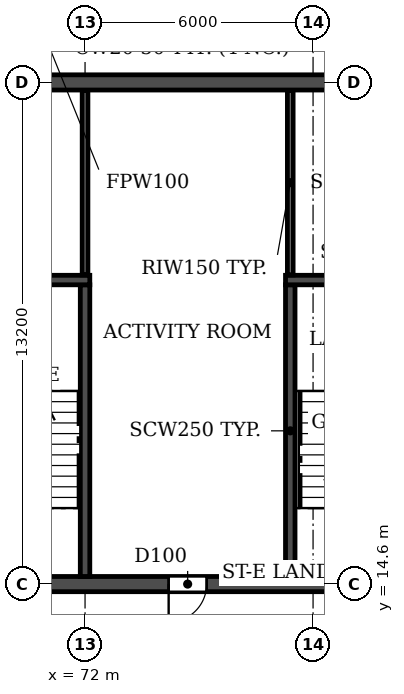
"""IFC4 building model, lengths in metres.
Left out: names, types, materials, properties, quantities, classifications, styles, units other than length and angle.
Written with IfcOpenShell. Run it as: python <this file> out.ifc"""

import sys

from ifc_helpers import new_model, si_unit, direction, frame, frame_2d, origin, place, context, subcontext, project, spatial, rectangle, extrude, element, fill, save


model = new_model("IFC4")
c1 = context("Model", 3, precision=1e-05, world=origin(), true_north=direction((0.0, 1.0)))
c2 = subcontext(c1, "Body", "Model", "MODEL_VIEW")
j1 = project(units=[si_unit("LENGTHUNIT", "METRE"), si_unit("PLANEANGLEUNIT", "RADIAN")], contexts=[c1])
p1 = place(None, origin())
s1 = spatial("IfcSite", under=j1, at=p1, CompositionType="ELEMENT")
p2 = place(p1, origin())
s2 = spatial("IfcBuilding", under=s1, at=p2, CompositionType="ELEMENT")
p3 = place(p2, frame((0.0, 0.0, 171.9)))
s3 = spatial("IfcBuildingStorey", under=s2, at=p3, CompositionType="ELEMENT", Elevation=171.9)
p4 = place(p3, frame((18.2, 14.6, 0.0), z_axis=(0.0, 0.0, 1.0), x_axis=(1.0, 0.0, 0.0)))
e1 = element("IfcWall", 1, at=p4, inside=s3, PredefinedType="SOLIDWALL", context=c2, shape_type="SweptSolid", body=[
    extrude(rectangle(XDim=65.6, YDim=0.4, at=frame_2d((32.8, 0.0))), origin(), (0.0, 0.0, 1.0), 3.08),
])
p5 = place(p4, frame((0.7, 0.0, 0.0)))
e2 = element("IfcOpeningElement", 2, at=p5, cuts=e1, PredefinedType="OPENING", context=c2, shape_type="SweptSolid", body=[
    extrude(rectangle(XDim=1.0, YDim=2.1, at=frame_2d((0.5, 1.05))), frame((0.0, 0.21, 0.0), z_axis=(0.0, -1.0, 0.0), x_axis=(1.0, 0.0, 0.0)), (0.0, 0.0, 1.0), 0.42),
])
p6 = place(p4, frame((8.6, 0.0, 0.0)))
e3 = element("IfcOpeningElement", 3, at=p6, cuts=e1, PredefinedType="OPENING", context=c2, shape_type="SweptSolid", body=[
    extrude(rectangle(XDim=1.0, YDim=2.1, at=frame_2d((0.5, 1.05))), frame((0.0, 0.21, 0.0), z_axis=(0.0, -1.0, 0.0), x_axis=(1.0, 0.0, 0.0)), (0.0, 0.0, 1.0), 0.42),
])
p7 = place(p4, frame((13.2, 0.0, 0.0)))
e4 = element("IfcOpeningElement", 4, at=p7, cuts=e1, PredefinedType="OPENING", context=c2, shape_type="SweptSolid", body=[
    extrude(rectangle(XDim=1.0, YDim=2.1, at=frame_2d((0.5, 1.05))), frame((0.0, 0.21, 0.0), z_axis=(0.0, -1.0, 0.0), x_axis=(1.0, 0.0, 0.0)), (0.0, 0.0, 1.0), 0.42),
])
p8 = place(p4, frame((25.8, 0.0, 0.0)))
e5 = element("IfcOpeningElement", 5, at=p8, cuts=e1, PredefinedType="OPENING", context=c2, shape_type="SweptSolid", body=[
    extrude(rectangle(XDim=1.0, YDim=2.1, at=frame_2d((0.5, 1.05))), frame((0.0, 0.21, 0.0), z_axis=(0.0, -1.0, 0.0), x_axis=(1.0, 0.0, 0.0)), (0.0, 0.0, 1.0), 0.42),
])
p9 = place(p4, frame((29.7, 0.0, 0.0)))
e6 = element("IfcOpeningElement", 6, at=p9, cuts=e1, PredefinedType="OPENING", context=c2, shape_type="SweptSolid", body=[
    extrude(rectangle(XDim=1.0, YDim=2.1, at=frame_2d((0.5, 1.05))), frame((0.0, 0.21, 0.0), z_axis=(0.0, -1.0, 0.0), x_axis=(1.0, 0.0, 0.0)), (0.0, 0.0, 1.0), 0.42),
])
p10 = place(p4, frame((32.3, 0.0, 0.0)))
e7 = element("IfcOpeningElement", 7, at=p10, cuts=e1, PredefinedType="OPENING", context=c2, shape_type="SweptSolid", body=[
    extrude(rectangle(XDim=1.0, YDim=2.1, at=frame_2d((0.5, 1.05))), frame((0.0, 0.21, 0.0), z_axis=(0.0, -1.0, 0.0), x_axis=(1.0, 0.0, 0.0)), (0.0, 0.0, 1.0), 0.42),
])
p11 = place(p4, frame((37.5, 0.0, 0.0)))
e8 = element("IfcOpeningElement", 8, at=p11, cuts=e1, PredefinedType="OPENING", context=c2, shape_type="SweptSolid", body=[
    extrude(rectangle(XDim=1.0, YDim=2.1, at=frame_2d((0.5, 1.05))), frame((0.0, 0.21, 0.0), z_axis=(0.0, -1.0, 0.0), x_axis=(1.0, 0.0, 0.0)), (0.0, 0.0, 1.0), 0.42),
])
p12 = place(p4, frame((51.4, 0.0, 0.0)))
e9 = element("IfcOpeningElement", 9, at=p12, cuts=e1, PredefinedType="OPENING", context=c2, shape_type="SweptSolid", body=[
    extrude(rectangle(XDim=1.0, YDim=2.1, at=frame_2d((0.5, 1.05))), frame((0.0, 0.21, 0.0), z_axis=(0.0, -1.0, 0.0), x_axis=(1.0, 0.0, 0.0)), (0.0, 0.0, 1.0), 0.42),
])
p13 = place(p4, frame((56.0, 0.0, 0.0)))
e10 = element("IfcOpeningElement", 10, at=p13, cuts=e1, PredefinedType="OPENING", context=c2, shape_type="SweptSolid", body=[
    extrude(rectangle(XDim=1.0, YDim=2.1, at=frame_2d((0.5, 1.05))), frame((0.0, 0.21, 0.0), z_axis=(0.0, -1.0, 0.0), x_axis=(1.0, 0.0, 0.0)), (0.0, 0.0, 1.0), 0.42),
])
p14 = place(p4, frame((63.9, 0.0, 0.0)))
e11 = element("IfcOpeningElement", 11, at=p14, cuts=e1, PredefinedType="OPENING", context=c2, shape_type="SweptSolid", body=[
    extrude(rectangle(XDim=1.0, YDim=2.1, at=frame_2d((0.5, 1.05))), frame((0.0, 0.21, 0.0), z_axis=(0.0, -1.0, 0.0), x_axis=(1.0, 0.0, 0.0)), (0.0, 0.0, 1.0), 0.42),
])
p15 = place(p3, frame((18.2, 27.8, 0.0), z_axis=(0.0, 0.0, 1.0), x_axis=(1.0, 0.0, 0.0)))
e12 = element("IfcWall", 12, at=p15, inside=s3, PredefinedType="SOLIDWALL", context=c2, shape_type="SweptSolid", body=[
    extrude(rectangle(XDim=65.6, YDim=0.4, at=frame_2d((32.8, 0.0))), origin(), (0.0, 0.0, 1.0), 3.08),
])
p16 = place(p15, frame((0.7, 0.0, 0.0)))
e13 = element("IfcOpeningElement", 13, at=p16, cuts=e12, PredefinedType="OPENING", context=c2, shape_type="SweptSolid", body=[
    extrude(rectangle(XDim=1.0, YDim=2.1, at=frame_2d((0.5, 1.05))), frame((0.0, 0.21, 0.0), z_axis=(0.0, -1.0, 0.0), x_axis=(1.0, 0.0, 0.0)), (0.0, 0.0, 1.0), 0.42),
])
p17 = place(p15, frame((4.05, 0.0, 0.0)))
e14 = element("IfcOpeningElement", 14, at=p17, cuts=e12, PredefinedType="OPENING", context=c2, shape_type="SweptSolid", body=[
    extrude(rectangle(XDim=0.9, YDim=2.1, at=frame_2d((0.45, 1.05))), frame((0.0, 0.21, 0.0), z_axis=(0.0, -1.0, 0.0), x_axis=(1.0, 0.0, 0.0)), (0.0, 0.0, 1.0), 0.42),
])
p18 = place(p15, frame((13.25, 0.0, 0.0)))
e15 = element("IfcOpeningElement", 15, at=p18, cuts=e12, PredefinedType="OPENING", context=c2, shape_type="SweptSolid", body=[
    extrude(rectangle(XDim=0.9, YDim=2.1, at=frame_2d((0.45, 1.05))), frame((0.0, 0.21, 0.0), z_axis=(0.0, -1.0, 0.0), x_axis=(1.0, 0.0, 0.0)), (0.0, 0.0, 1.0), 0.42),
])
p19 = place(p15, frame((17.7, 0.0, 0.0)))
e16 = element("IfcOpeningElement", 16, at=p19, cuts=e12, PredefinedType="OPENING", context=c2, shape_type="SweptSolid", body=[
    extrude(rectangle(XDim=1.0, YDim=2.1, at=frame_2d((0.5, 1.05))), frame((0.0, 0.21, 0.0), z_axis=(0.0, -1.0, 0.0), x_axis=(1.0, 0.0, 0.0)), (0.0, 0.0, 1.0), 0.42),
])
p20 = place(p15, frame((22.9, 0.0, 0.0)))
e17 = element("IfcOpeningElement", 17, at=p20, cuts=e12, PredefinedType="OPENING", context=c2, shape_type="SweptSolid", body=[
    extrude(rectangle(XDim=1.0, YDim=2.1, at=frame_2d((0.5, 1.05))), frame((0.0, 0.21, 0.0), z_axis=(0.0, -1.0, 0.0), x_axis=(1.0, 0.0, 0.0)), (0.0, 0.0, 1.0), 0.42),
])
p21 = place(p15, frame((29.4, 0.0, 0.0)))
e18 = element("IfcOpeningElement", 18, at=p21, cuts=e12, PredefinedType="OPENING", context=c2, shape_type="SweptSolid", body=[
    extrude(rectangle(XDim=1.0, YDim=2.1, at=frame_2d((0.5, 1.05))), frame((0.0, 0.21, 0.0), z_axis=(0.0, -1.0, 0.0), x_axis=(1.0, 0.0, 0.0)), (0.0, 0.0, 1.0), 0.42),
])
p22 = place(p15, frame((32.3, 0.0, 0.0)))
e19 = element("IfcOpeningElement", 19, at=p22, cuts=e12, PredefinedType="OPENING", context=c2, shape_type="SweptSolid", body=[
    extrude(rectangle(XDim=1.0, YDim=2.1, at=frame_2d((0.5, 1.05))), frame((0.0, 0.21, 0.0), z_axis=(0.0, -1.0, 0.0), x_axis=(1.0, 0.0, 0.0)), (0.0, 0.0, 1.0), 0.42),
])
p23 = place(p15, frame((36.5, 0.0, 0.0)))
e20 = element("IfcOpeningElement", 20, at=p23, cuts=e12, PredefinedType="OPENING", context=c2, shape_type="SweptSolid", body=[
    extrude(rectangle(XDim=1.0, YDim=2.1, at=frame_2d((0.5, 1.05))), frame((0.0, 0.21, 0.0), z_axis=(0.0, -1.0, 0.0), x_axis=(1.0, 0.0, 0.0)), (0.0, 0.0, 1.0), 0.42),
])
p24 = place(p15, frame((41.7, 0.0, 0.0)))
e21 = element("IfcOpeningElement", 21, at=p24, cuts=e12, PredefinedType="OPENING", context=c2, shape_type="SweptSolid", body=[
    extrude(rectangle(XDim=1.0, YDim=2.1, at=frame_2d((0.5, 1.05))), frame((0.0, 0.21, 0.0), z_axis=(0.0, -1.0, 0.0), x_axis=(1.0, 0.0, 0.0)), (0.0, 0.0, 1.0), 0.42),
])
p25 = place(p15, frame((45.6, 0.0, 0.0)))
e22 = element("IfcOpeningElement", 22, at=p25, cuts=e12, PredefinedType="OPENING", context=c2, shape_type="SweptSolid", body=[
    extrude(rectangle(XDim=1.0, YDim=2.1, at=frame_2d((0.5, 1.05))), frame((0.0, 0.21, 0.0), z_axis=(0.0, -1.0, 0.0), x_axis=(1.0, 0.0, 0.0)), (0.0, 0.0, 1.0), 0.42),
])
p26 = place(p15, frame((48.2, 0.0, 0.0)))
e23 = element("IfcOpeningElement", 23, at=p26, cuts=e12, PredefinedType="OPENING", context=c2, shape_type="SweptSolid", body=[
    extrude(rectangle(XDim=1.0, YDim=2.1, at=frame_2d((0.5, 1.05))), frame((0.0, 0.21, 0.0), z_axis=(0.0, -1.0, 0.0), x_axis=(1.0, 0.0, 0.0)), (0.0, 0.0, 1.0), 0.42),
])
p27 = place(p15, frame((51.45, 0.0, 0.0)))
e24 = element("IfcOpeningElement", 24, at=p27, cuts=e12, PredefinedType="OPENING", context=c2, shape_type="SweptSolid", body=[
    extrude(rectangle(XDim=0.9, YDim=2.1, at=frame_2d((0.45, 1.05))), frame((0.0, 0.21, 0.0), z_axis=(0.0, -1.0, 0.0), x_axis=(1.0, 0.0, 0.0)), (0.0, 0.0, 1.0), 0.42),
])
p28 = place(p15, frame((60.65, 0.0, 0.0)))
e25 = element("IfcOpeningElement", 25, at=p28, cuts=e12, PredefinedType="OPENING", context=c2, shape_type="SweptSolid", body=[
    extrude(rectangle(XDim=0.9, YDim=2.1, at=frame_2d((0.45, 1.05))), frame((0.0, 0.21, 0.0), z_axis=(0.0, -1.0, 0.0), x_axis=(1.0, 0.0, 0.0)), (0.0, 0.0, 1.0), 0.42),
])
p29 = place(p15, frame((63.9, 0.0, 0.0)))
e26 = element("IfcOpeningElement", 26, at=p29, cuts=e12, PredefinedType="OPENING", context=c2, shape_type="SweptSolid", body=[
    extrude(rectangle(XDim=1.0, YDim=2.1, at=frame_2d((0.5, 1.05))), frame((0.0, 0.21, 0.0), z_axis=(0.0, -1.0, 0.0), x_axis=(1.0, 0.0, 0.0)), (0.0, 0.0, 1.0), 0.42),
])
p30 = place(p3, frame((72.0, 14.8, 0.0), z_axis=(0.0, 0.0, 1.0), x_axis=(0.0, 1.0, 0.0)))
e27 = element("IfcWall", 27, at=p30, inside=s3, PredefinedType="SOLIDWALL", context=c2, shape_type="SweptSolid", body=[
    extrude(rectangle(XDim=7.675, YDim=0.25, at=frame_2d((3.837, 0.0))), origin(), (0.0, 0.0, 1.0), 3.08),
])
p31 = place(p3, frame((68.075, 22.6, 0.0), z_axis=(0.0, 0.0, 1.0), x_axis=(1.0, 0.0, 0.0)))
e28 = element("IfcWall", 28, at=p31, inside=s3, PredefinedType="SOLIDWALL", context=c2, shape_type="SweptSolid", body=[
    extrude(rectangle(XDim=4.05, YDim=0.25, at=frame_2d((2.025, 0.0))), origin(), (0.0, 0.0, 1.0), 3.08),
])
p32 = place(p3, frame((77.4, 14.8, 0.0), z_axis=(0.0, 0.0, 1.0), x_axis=(0.0, 1.0, 0.0)))
e29 = element("IfcWall", 29, at=p32, inside=s3, PredefinedType="SOLIDWALL", context=c2, shape_type="SweptSolid", body=[
    extrude(rectangle(XDim=7.675, YDim=0.25, at=frame_2d((3.837, 0.0))), origin(), (0.0, 0.0, 1.0), 3.08),
])
p33 = place(p3, frame((77.275, 22.6, 0.0), z_axis=(0.0, 0.0, 1.0), x_axis=(1.0, 0.0, 0.0)))
e30 = element("IfcWall", 30, at=p33, inside=s3, PredefinedType="SOLIDWALL", context=c2, shape_type="SweptSolid", body=[
    extrude(rectangle(XDim=4.05, YDim=0.25, at=frame_2d((2.025, 0.0))), origin(), (0.0, 0.0, 1.0), 3.08),
])
for number, where, z_axis, x_axis in (
    (31, (72.0, 22.735, 0.0), (0.0, 0.0, 1.0), (0.0, 1.0, 0.0)),
    (32, (77.4, 22.735, 0.0), (0.0, 0.0, 1.0), (0.0, 1.0, 0.0)),
):
    element("IfcWall", number, at=place(p3, frame(where, z_axis=z_axis, x_axis=x_axis)), inside=s3, PredefinedType="PARTITIONING", context=c2, shape_type="SweptSolid", body=[
        extrude(rectangle(XDim=4.855, YDim=0.15, at=frame_2d((2.427, 0.0))), origin(), (0.0, 0.0, 1.0), 3.08),
    ])
p34 = place(p13, frame((1.0, 0.0, 0.0), z_axis=(0.0, 0.0, 1.0), x_axis=(-1.0, 0.0, 0.0)))
e33 = element("IfcDoor", 33, at=p34, inside=s3, OperationType="SINGLE_SWING_RIGHT", PredefinedType="DOOR", context=c2, shape_type="SweptSolid", body=[
    extrude(rectangle(XDim=1.0, YDim=2.1, at=frame_2d((0.5, 1.05))), frame((0.0, 0.025, 0.0), z_axis=(0.0, -1.0, 0.0), x_axis=(1.0, 0.0, 0.0)), (0.0, 0.0, 1.0), 0.05),
])
fill(e10, e33)
save(model, sys.argv[1])
